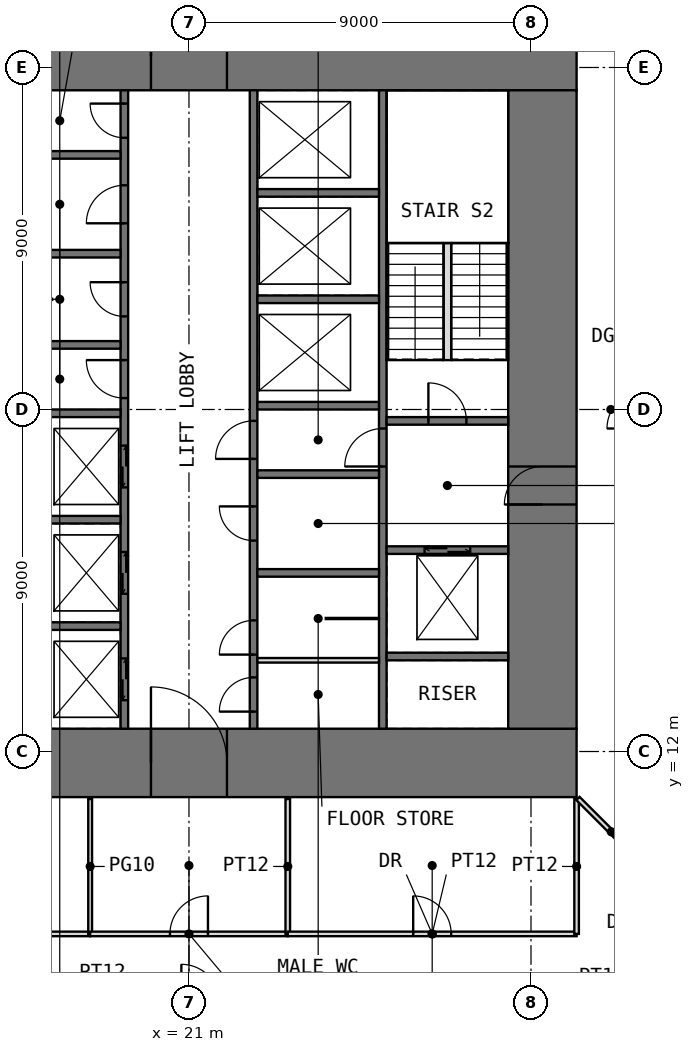
"""IFC4 building model, lengths in metres.
Left out: names, types, materials, properties, quantities, classifications, styles, units other than length and angle.
Written with IfcOpenShell. Run it as: python <this file> out.ifc"""

import sys

from ifc_helpers import new_model, si_unit, direction, frame, frame_2d, origin, place, context, subcontext, project, spatial, rectangle, extrude, element, fill, save


model = new_model("IFC4")
c1 = context("Model", 3, precision=1e-05, world=origin(), true_north=direction((0.0, 1.0)))
c2 = subcontext(c1, "Body", "Model", "MODEL_VIEW")
j1 = project(units=[si_unit("LENGTHUNIT", "METRE"), si_unit("PLANEANGLEUNIT", "RADIAN")], contexts=[c1])
p1 = place(None, origin())
s1 = spatial("IfcSite", under=j1, at=p1, CompositionType="ELEMENT")
p2 = place(p1, origin())
s2 = spatial("IfcBuilding", under=s1, at=p2, CompositionType="ELEMENT")
p3 = place(p2, frame((0.0, 0.0, 38.5)))
s3 = spatial("IfcBuildingStorey", under=s2, at=p3, CompositionType="ELEMENT", Elevation=38.5)
p4 = place(p3, frame((10.8, 11.7, -0.05), z_axis=(0.0, 0.0, 1.0), x_axis=(1.0, 0.0, 0.0)))
e1 = element("IfcWall", 1, at=p4, inside=s3, PredefinedType="SHEAR", context=c2, shape_type="SweptSolid", body=[
    extrude(rectangle(XDim=20.4, YDim=1.8, at=frame_2d((10.2, 0.0))), origin(), (0.0, 0.0, 1.0), 4.0),
])
p5 = place(p4, frame((9.2, 0.0, 0.05)))
e2 = element("IfcOpeningElement", 2, at=p5, cuts=e1, PredefinedType="OPENING", context=c2, shape_type="SweptSolid", body=[
    extrude(rectangle(XDim=2.0, YDim=2.2, at=frame_2d((1.0, 1.1))), frame((0.0, 0.91, 0.0), z_axis=(0.0, -1.0, 0.0), x_axis=(1.0, 0.0, 0.0)), (0.0, 0.0, 1.0), 1.82),
])
p6 = place(p3, frame((10.8, 30.3, -0.05), z_axis=(0.0, 0.0, 1.0), x_axis=(1.0, 0.0, 0.0)))
e3 = element("IfcWall", 3, at=p6, inside=s3, PredefinedType="SHEAR", context=c2, shape_type="SweptSolid", body=[
    extrude(rectangle(XDim=20.4, YDim=1.8, at=frame_2d((10.2, 0.0))), origin(), (0.0, 0.0, 1.0), 4.0),
])
p7 = place(p6, frame((9.2, 0.0, 0.05)))
e4 = element("IfcOpeningElement", 4, at=p7, cuts=e3, PredefinedType="OPENING", context=c2, shape_type="SweptSolid", body=[
    extrude(rectangle(XDim=2.0, YDim=2.2, at=frame_2d((1.0, 1.1))), frame((0.0, 0.91, 0.0), z_axis=(0.0, -1.0, 0.0), x_axis=(1.0, 0.0, 0.0)), (0.0, 0.0, 1.0), 1.82),
])
p8 = place(p3, frame((30.3, 12.6, -0.05), z_axis=(0.0, 0.0, 1.0), x_axis=(0.0, 1.0, 0.0)))
e5 = element("IfcWall", 5, at=p8, inside=s3, PredefinedType="SHEAR", context=c2, shape_type="SweptSolid", body=[
    extrude(rectangle(XDim=16.8, YDim=1.8, at=frame_2d((8.4, 0.0))), origin(), (0.0, 0.0, 1.0), 4.0),
])
p9 = place(p8, frame((5.9, 0.0, 0.05)))
e6 = element("IfcOpeningElement", 6, at=p9, cuts=e5, PredefinedType="OPENING", context=c2, shape_type="SweptSolid", body=[
    extrude(rectangle(XDim=1.0, YDim=2.2, at=frame_2d((0.5, 1.1))), frame((0.0, 0.91, 0.0), z_axis=(0.0, -1.0, 0.0), x_axis=(1.0, 0.0, 0.0)), (0.0, 0.0, 1.0), 1.82),
])
p10 = place(p3, frame((19.3, 12.6, -0.05), z_axis=(0.0, 0.0, 1.0), x_axis=(0.0, 1.0, 0.0)))
e7 = element("IfcWall", 7, at=p10, inside=s3, PredefinedType="SHEAR", context=c2, shape_type="SweptSolid", body=[
    extrude(rectangle(XDim=16.8, YDim=0.2, at=frame_2d((8.4, 0.0))), origin(), (0.0, 0.0, 1.0), 4.0),
])
p11 = place(p10, frame((8.7, 0.0, 0.05)))
e8 = element("IfcOpeningElement", 8, at=p11, cuts=e7, PredefinedType="OPENING", context=c2, shape_type="SweptSolid", body=[
    extrude(rectangle(XDim=1.0, YDim=2.2, at=frame_2d((0.5, 1.1))), frame((0.0, 0.11, 0.0), z_axis=(0.0, -1.0, 0.0), x_axis=(1.0, 0.0, 0.0)), (0.0, 0.0, 1.0), 0.22),
])
p12 = place(p10, frame((10.85, 0.0, 0.05)))
e9 = element("IfcOpeningElement", 9, at=p12, cuts=e7, PredefinedType="OPENING", context=c2, shape_type="SweptSolid", body=[
    extrude(rectangle(XDim=0.9, YDim=2.2, at=frame_2d((0.45, 1.1))), frame((0.0, 0.11, 0.0), z_axis=(0.0, -1.0, 0.0), x_axis=(1.0, 0.0, 0.0)), (0.0, 0.0, 1.0), 0.22),
])
p13 = place(p10, frame((13.3, 0.0, 0.05)))
e10 = element("IfcOpeningElement", 10, at=p13, cuts=e7, PredefinedType="OPENING", context=c2, shape_type="SweptSolid", body=[
    extrude(rectangle(XDim=1.0, YDim=2.2, at=frame_2d((0.5, 1.1))), frame((0.0, 0.11, 0.0), z_axis=(0.0, -1.0, 0.0), x_axis=(1.0, 0.0, 0.0)), (0.0, 0.0, 1.0), 0.22),
])
p14 = place(p10, frame((15.55, 0.0, 0.05)))
e11 = element("IfcOpeningElement", 11, at=p14, cuts=e7, PredefinedType="OPENING", context=c2, shape_type="SweptSolid", body=[
    extrude(rectangle(XDim=0.9, YDim=2.2, at=frame_2d((0.45, 1.1))), frame((0.0, 0.11, 0.0), z_axis=(0.0, -1.0, 0.0), x_axis=(1.0, 0.0, 0.0)), (0.0, 0.0, 1.0), 0.22),
])
p15 = place(p10, frame((0.75, 0.0, 0.05)))
e12 = element("IfcOpeningElement", 12, at=p15, cuts=e7, PredefinedType="OPENING", context=c2, shape_type="SweptSolid", body=[
    extrude(rectangle(XDim=1.1, YDim=2.2, at=frame_2d((0.55, 1.1))), frame((0.0, 0.11, 0.0), z_axis=(0.0, -1.0, 0.0), x_axis=(1.0, 0.0, 0.0)), (0.0, 0.0, 1.0), 0.22),
])
p16 = place(p10, frame((3.55, 0.0, 0.05)))
e13 = element("IfcOpeningElement", 13, at=p16, cuts=e7, PredefinedType="OPENING", context=c2, shape_type="SweptSolid", body=[
    extrude(rectangle(XDim=1.1, YDim=2.2, at=frame_2d((0.55, 1.1))), frame((0.0, 0.11, 0.0), z_axis=(0.0, -1.0, 0.0), x_axis=(1.0, 0.0, 0.0)), (0.0, 0.0, 1.0), 0.22),
])
p17 = place(p10, frame((6.35, 0.0, 0.05)))
e14 = element("IfcOpeningElement", 14, at=p17, cuts=e7, PredefinedType="OPENING", context=c2, shape_type="SweptSolid", body=[
    extrude(rectangle(XDim=1.1, YDim=2.2, at=frame_2d((0.55, 1.1))), frame((0.0, 0.11, 0.0), z_axis=(0.0, -1.0, 0.0), x_axis=(1.0, 0.0, 0.0)), (0.0, 0.0, 1.0), 0.22),
])
p18 = place(p3, frame((22.7, 12.6, -0.05), z_axis=(0.0, 0.0, 1.0), x_axis=(0.0, 1.0, 0.0)))
e15 = element("IfcWall", 15, at=p18, inside=s3, PredefinedType="SHEAR", context=c2, shape_type="SweptSolid", body=[
    extrude(rectangle(XDim=16.8, YDim=0.2, at=frame_2d((8.4, 0.0))), origin(), (0.0, 0.0, 1.0), 4.0),
])
p19 = place(p18, frame((0.45, 0.0, 0.05)))
e16 = element("IfcOpeningElement", 16, at=p19, cuts=e15, PredefinedType="OPENING", context=c2, shape_type="SweptSolid", body=[
    extrude(rectangle(XDim=0.9, YDim=2.2, at=frame_2d((0.45, 1.1))), frame((0.0, 0.11, 0.0), z_axis=(0.0, -1.0, 0.0), x_axis=(1.0, 0.0, 0.0)), (0.0, 0.0, 1.0), 0.22),
])
p20 = place(p18, frame((7.1, 0.0, 0.05)))
e17 = element("IfcOpeningElement", 17, at=p20, cuts=e15, PredefinedType="OPENING", context=c2, shape_type="SweptSolid", body=[
    extrude(rectangle(XDim=1.0, YDim=2.2, at=frame_2d((0.5, 1.1))), frame((0.0, 0.11, 0.0), z_axis=(0.0, -1.0, 0.0), x_axis=(1.0, 0.0, 0.0)), (0.0, 0.0, 1.0), 0.22),
])
p21 = place(p18, frame((1.95, 0.0, 0.05)))
e18 = element("IfcOpeningElement", 18, at=p21, cuts=e15, PredefinedType="OPENING", context=c2, shape_type="SweptSolid", body=[
    extrude(rectangle(XDim=0.9, YDim=2.2, at=frame_2d((0.45, 1.1))), frame((0.0, 0.11, 0.0), z_axis=(0.0, -1.0, 0.0), x_axis=(1.0, 0.0, 0.0)), (0.0, 0.0, 1.0), 0.22),
])
p22 = place(p18, frame((4.95, 0.0, 0.05)))
e19 = element("IfcOpeningElement", 19, at=p22, cuts=e15, PredefinedType="OPENING", context=c2, shape_type="SweptSolid", body=[
    extrude(rectangle(XDim=0.9, YDim=2.2, at=frame_2d((0.45, 1.1))), frame((0.0, 0.11, 0.0), z_axis=(0.0, -1.0, 0.0), x_axis=(1.0, 0.0, 0.0)), (0.0, 0.0, 1.0), 0.22),
])
p23 = place(p3, frame((26.1, 12.6, -0.05), z_axis=(0.0, 0.0, 1.0), x_axis=(0.0, 1.0, 0.0)))
e20 = element("IfcWall", 20, at=p23, inside=s3, PredefinedType="SHEAR", context=c2, shape_type="SweptSolid", body=[
    extrude(rectangle(XDim=16.8, YDim=0.2, at=frame_2d((8.4, 0.0))), origin(), (0.0, 0.0, 1.0), 4.0),
])
p24 = place(p23, frame((6.9, 0.0, 0.05)))
e21 = element("IfcOpeningElement", 21, at=p24, cuts=e20, PredefinedType="OPENING", context=c2, shape_type="SweptSolid", body=[
    extrude(rectangle(XDim=1.0, YDim=2.2, at=frame_2d((0.5, 1.1))), frame((0.0, 0.11, 0.0), z_axis=(0.0, -1.0, 0.0), x_axis=(1.0, 0.0, 0.0)), (0.0, 0.0, 1.0), 0.22),
])
for number, where, z_axis, x_axis in (
    (22, (16.0, 15.3, -0.05), (0.0, 0.0, 1.0), (1.0, 0.0, 0.0)),
    (23, (16.0, 18.1, -0.05), (0.0, 0.0, 1.0), (1.0, 0.0, 0.0)),
    (24, (16.0, 20.9, -0.05), (0.0, 0.0, 1.0), (1.0, 0.0, 0.0)),
    (25, (16.0, 22.7, -0.05), (0.0, 0.0, 1.0), (1.0, 0.0, 0.0)),
    (26, (16.0, 25.1, -0.05), (0.0, 0.0, 1.0), (1.0, 0.0, 0.0)),
    (27, (16.0, 27.7, -0.05), (0.0, 0.0, 1.0), (1.0, 0.0, 0.0)),
    (28, (22.8, 16.7, -0.05), (0.0, 0.0, 1.0), (1.0, 0.0, 0.0)),
    (29, (22.8, 19.3, -0.05), (0.0, 0.0, 1.0), (1.0, 0.0, 0.0)),
    (30, (22.8, 21.1, -0.05), (0.0, 0.0, 1.0), (1.0, 0.0, 0.0)),
    (31, (22.8, 23.9, -0.05), (0.0, 0.0, 1.0), (1.0, 0.0, 0.0)),
    (32, (22.8, 26.7, -0.05), (0.0, 0.0, 1.0), (1.0, 0.0, 0.0)),
    (33, (26.2, 14.5, -0.05), (0.0, 0.0, 1.0), (1.0, 0.0, 0.0)),
):
    element("IfcWall", number, at=place(p3, frame(where, z_axis=z_axis, x_axis=x_axis)), inside=s3, PredefinedType="SHEAR", context=c2, shape_type="SweptSolid", body=[
        extrude(rectangle(XDim=3.2, YDim=0.2, at=frame_2d((1.6, 0.0))), origin(), (0.0, 0.0, 1.0), 4.0),
    ])
p25 = place(p3, frame((26.2, 17.3, -0.05), z_axis=(0.0, 0.0, 1.0), x_axis=(1.0, 0.0, 0.0)))
e34 = element("IfcWall", 34, at=p25, inside=s3, PredefinedType="SHEAR", context=c2, shape_type="SweptSolid", body=[
    extrude(rectangle(XDim=3.2, YDim=0.2, at=frame_2d((1.6, 0.0))), origin(), (0.0, 0.0, 1.0), 4.0),
])
p26 = place(p25, frame((1.0, 0.0, 0.05)))
e35 = element("IfcOpeningElement", 35, at=p26, cuts=e34, PredefinedType="OPENING", context=c2, shape_type="SweptSolid", body=[
    extrude(rectangle(XDim=1.2, YDim=2.2, at=frame_2d((0.6, 1.1))), frame((0.0, 0.11, 0.0), z_axis=(0.0, -1.0, 0.0), x_axis=(1.0, 0.0, 0.0)), (0.0, 0.0, 1.0), 0.22),
])
p27 = place(p3, frame((26.2, 20.7, -0.05), z_axis=(0.0, 0.0, 1.0), x_axis=(1.0, 0.0, 0.0)))
e36 = element("IfcWall", 36, at=p27, inside=s3, PredefinedType="SHEAR", context=c2, shape_type="SweptSolid", body=[
    extrude(rectangle(XDim=3.2, YDim=0.2, at=frame_2d((1.6, 0.0))), origin(), (0.0, 0.0, 1.0), 4.0),
])
p28 = place(p27, frame((1.1, 0.0, 0.05)))
e37 = element("IfcOpeningElement", 37, at=p28, cuts=e36, PredefinedType="OPENING", context=c2, shape_type="SweptSolid", body=[
    extrude(rectangle(XDim=1.0, YDim=2.2, at=frame_2d((0.5, 1.1))), frame((0.0, 0.11, 0.0), z_axis=(0.0, -1.0, 0.0), x_axis=(1.0, 0.0, 0.0)), (0.0, 0.0, 1.0), 0.22),
])
p29 = place(p3, frame((22.8, 14.4, 0.0), z_axis=(0.0, 0.0, 1.0), x_axis=(1.0, 0.0, 0.0)))
e38 = element("IfcWall", 38, at=p29, inside=s3, PredefinedType="PARTITIONING", context=c2, shape_type="SweptSolid", body=[
    extrude(rectangle(XDim=3.2, YDim=0.12, at=frame_2d((1.6, 0.0))), origin(), (0.0, 0.0, 1.0), 3.75),
])
p30 = place(p3, frame((24.6, 15.5, 0.0), z_axis=(0.0, 0.0, 1.0), x_axis=(1.0, 0.0, 0.0)))
e39 = element("IfcWall", 39, at=p30, inside=s3, PredefinedType="PARTITIONING", context=c2, shape_type="SweptSolid", body=[
    extrude(rectangle(XDim=1.4, YDim=0.03, at=frame_2d((0.7, 0.0))), origin(), (0.0, 0.0, 1.0), 3.75),
])
p31 = place(p3, frame((14.4, 7.2, 0.0), z_axis=(0.0, 0.0, 1.0), x_axis=(1.0, 0.0, 0.0)))
e40 = element("IfcWall", 40, at=p31, inside=s3, PredefinedType="PARTITIONING", context=c2, shape_type="SweptSolid", body=[
    extrude(rectangle(XDim=4.0, YDim=0.12, at=frame_2d((2.0, 0.0))), origin(), (0.0, 0.0, 1.0), 3.75),
])
p32 = place(p31, frame((1.5, 0.0, 0.0)))
e41 = element("IfcOpeningElement", 41, at=p32, cuts=e40, PredefinedType="OPENING", context=c2, shape_type="SweptSolid", body=[
    extrude(rectangle(XDim=1.0, YDim=2.4, at=frame_2d((0.5, 1.2))), frame((0.0, 0.07, 0.0), z_axis=(0.0, -1.0, 0.0), x_axis=(1.0, 0.0, 0.0)), (0.0, 0.0, 1.0), 0.14),
])
p33 = place(p3, frame((18.4, 7.2, 0.0), z_axis=(0.0, 0.0, 1.0), x_axis=(0.0, 1.0, 0.0)))
e42 = element("IfcWall", 42, at=p33, inside=s3, PredefinedType="PARTITIONING", context=c2, shape_type="SweptSolid", body=[
    extrude(rectangle(XDim=3.55, YDim=0.1, at=frame_2d((1.775, 0.0))), origin(), (0.0, 0.0, 1.0), 3.75),
])
p34 = place(p3, frame((18.4, 7.2, 0.0), z_axis=(0.0, 0.0, 1.0), x_axis=(1.0, 0.0, 0.0)))
e43 = element("IfcWall", 43, at=p34, inside=s3, PredefinedType="PARTITIONING", context=c2, shape_type="SweptSolid", body=[
    extrude(rectangle(XDim=5.2, YDim=0.12, at=frame_2d((2.6, 0.0))), origin(), (0.0, 0.0, 1.0), 3.75),
])
p35 = place(p34, frame((2.1, 0.0, 0.0)))
e44 = element("IfcOpeningElement", 44, at=p35, cuts=e43, PredefinedType="OPENING", context=c2, shape_type="SweptSolid", body=[
    extrude(rectangle(XDim=1.0, YDim=2.4, at=frame_2d((0.5, 1.2))), frame((0.0, 0.07, 0.0), z_axis=(0.0, -1.0, 0.0), x_axis=(1.0, 0.0, 0.0)), (0.0, 0.0, 1.0), 0.14),
])
p36 = place(p3, frame((23.6, 7.2, 0.0), z_axis=(0.0, 0.0, 1.0), x_axis=(0.0, 1.0, 0.0)))
e45 = element("IfcWall", 45, at=p36, inside=s3, PredefinedType="PARTITIONING", context=c2, shape_type="SweptSolid", body=[
    extrude(rectangle(XDim=3.55, YDim=0.12, at=frame_2d((1.775, 0.0))), origin(), (0.0, 0.0, 1.0), 3.75),
])
p37 = place(p3, frame((23.6, 7.2, 0.0), z_axis=(0.0, 0.0, 1.0), x_axis=(1.0, 0.0, 0.0)))
e46 = element("IfcWall", 46, at=p37, inside=s3, PredefinedType="PARTITIONING", context=c2, shape_type="SweptSolid", body=[
    extrude(rectangle(XDim=7.6, YDim=0.12, at=frame_2d((3.8, 0.0))), origin(), (0.0, 0.0, 1.0), 3.75),
])
p38 = place(p37, frame((3.3, 0.0, 0.0)))
e47 = element("IfcOpeningElement", 47, at=p38, cuts=e46, PredefinedType="OPENING", context=c2, shape_type="SweptSolid", body=[
    extrude(rectangle(XDim=1.0, YDim=2.2, at=frame_2d((0.5, 1.1))), frame((0.0, 0.07, 0.0), z_axis=(0.0, -1.0, 0.0), x_axis=(1.0, 0.0, 0.0)), (0.0, 0.0, 1.0), 0.14),
])
p39 = place(p3, frame((31.2, 7.2, 0.0), z_axis=(0.0, 0.0, 1.0), x_axis=(0.0, 1.0, 0.0)))
e48 = element("IfcWall", 48, at=p39, inside=s3, PredefinedType="PARTITIONING", context=c2, shape_type="SweptSolid", body=[
    extrude(rectangle(XDim=3.55, YDim=0.12, at=frame_2d((1.775, 0.0))), origin(), (0.0, 0.0, 1.0), 3.75),
])
p40 = place(p3, frame((31.235, 10.765, 0.0), z_axis=(0.0, 0.0, 1.0), x_axis=(0.707106781187, -0.707106781187, 0.0)))
e49 = element("IfcWall", 49, at=p40, inside=s3, PredefinedType="PARTITIONING", context=c2, shape_type="SweptSolid", body=[
    extrude(rectangle(XDim=2.481, YDim=0.12, at=frame_2d((1.241, 0.0))), origin(), (0.0, 0.0, 1.0), 3.75),
])
p41 = place(p3, frame((27.8, 22.3, 0.0), z_axis=(0.0, 0.0, 1.0), x_axis=(0.0, 1.0, 0.0)))
e50 = element("IfcWall", 50, at=p41, inside=s3, PredefinedType="PARTITIONING", context=c2, shape_type="SweptSolid", body=[
    extrude(rectangle(XDim=3.08, YDim=0.2, at=frame_2d((1.54, 0.0))), origin(), (0.0, 0.0, 1.0), 4.0),
])
p42 = place(p5, origin())
e51 = element("IfcDoor", 51, at=p42, inside=s3, OperationType="DOUBLE_DOOR_SINGLE_SWING", PredefinedType="DOOR", context=c2, shape_type="SweptSolid", body=[
    extrude(rectangle(XDim=2.0, YDim=2.2, at=frame_2d((1.0, 1.1))), frame((0.0, 0.025, 0.0), z_axis=(0.0, -1.0, 0.0), x_axis=(1.0, 0.0, 0.0)), (0.0, 0.0, 1.0), 0.05),
])
fill(e2, e51)
p43 = place(p7, origin())
e52 = element("IfcDoor", 52, at=p43, inside=s3, OperationType="DOUBLE_DOOR_SINGLE_SWING", PredefinedType="DOOR", context=c2, shape_type="SweptSolid", body=[
    extrude(rectangle(XDim=2.0, YDim=2.2, at=frame_2d((1.0, 1.1))), frame((0.0, 0.025, 0.0), z_axis=(0.0, -1.0, 0.0), x_axis=(1.0, 0.0, 0.0)), (0.0, 0.0, 1.0), 0.05),
])
fill(e4, e52)
p44 = place(p19, origin())
e53 = element("IfcDoor", 53, at=p44, inside=s3, OperationType="SINGLE_SWING_LEFT", PredefinedType="DOOR", context=c2, shape_type="SweptSolid", body=[
    extrude(rectangle(XDim=0.9, YDim=2.2, at=frame_2d((0.45, 1.1))), frame((0.0, 0.025, 0.0), z_axis=(0.0, -1.0, 0.0), x_axis=(1.0, 0.0, 0.0)), (0.0, 0.0, 1.0), 0.05),
])
fill(e16, e53)
p45 = place(p9, origin())
e54 = element("IfcDoor", 54, at=p45, inside=s3, OperationType="SINGLE_SWING_LEFT", PredefinedType="DOOR", context=c2, shape_type="SweptSolid", body=[
    extrude(rectangle(XDim=1.0, YDim=2.2, at=frame_2d((0.5, 1.1))), frame((0.0, 0.025, 0.0), z_axis=(0.0, -1.0, 0.0), x_axis=(1.0, 0.0, 0.0)), (0.0, 0.0, 1.0), 0.05),
])
fill(e6, e54)
p46 = place(p28, origin())
e55 = element("IfcDoor", 55, at=p46, inside=s3, OperationType="SINGLE_SWING_LEFT", PredefinedType="DOOR", context=c2, shape_type="SweptSolid", body=[
    extrude(rectangle(XDim=1.0, YDim=2.2, at=frame_2d((0.5, 1.1))), frame((0.0, 0.025, 0.0), z_axis=(0.0, -1.0, 0.0), x_axis=(1.0, 0.0, 0.0)), (0.0, 0.0, 1.0), 0.05),
])
fill(e37, e55)
p47 = place(p24, origin())
e56 = element("IfcDoor", 56, at=p47, inside=s3, OperationType="SINGLE_SWING_LEFT", PredefinedType="DOOR", context=c2, shape_type="SweptSolid", body=[
    extrude(rectangle(XDim=1.0, YDim=2.2, at=frame_2d((0.5, 1.1))), frame((0.0, 0.025, 0.0), z_axis=(0.0, -1.0, 0.0), x_axis=(1.0, 0.0, 0.0)), (0.0, 0.0, 1.0), 0.05),
])
fill(e21, e56)
p48 = place(p11, origin())
e57 = element("IfcDoor", 57, at=p48, inside=s3, OperationType="SINGLE_SWING_RIGHT", PredefinedType="DOOR", context=c2, shape_type="SweptSolid", body=[
    extrude(rectangle(XDim=1.0, YDim=2.2, at=frame_2d((0.5, 1.1))), frame((0.0, 0.025, 0.0), z_axis=(0.0, -1.0, 0.0), x_axis=(1.0, 0.0, 0.0)), (0.0, 0.0, 1.0), 0.05),
])
fill(e8, e57)
p49 = place(p20, origin())
e58 = element("IfcDoor", 58, at=p49, inside=s3, OperationType="SINGLE_SWING_LEFT", PredefinedType="DOOR", context=c2, shape_type="SweptSolid", body=[
    extrude(rectangle(XDim=1.0, YDim=2.2, at=frame_2d((0.5, 1.1))), frame((0.0, 0.025, 0.0), z_axis=(0.0, -1.0, 0.0), x_axis=(1.0, 0.0, 0.0)), (0.0, 0.0, 1.0), 0.05),
])
fill(e17, e58)
p50 = place(p12, origin())
e59 = element("IfcDoor", 59, at=p50, inside=s3, OperationType="SINGLE_SWING_RIGHT", PredefinedType="DOOR", context=c2, shape_type="SweptSolid", body=[
    extrude(rectangle(XDim=0.9, YDim=2.2, at=frame_2d((0.45, 1.1))), frame((0.0, 0.025, 0.0), z_axis=(0.0, -1.0, 0.0), x_axis=(1.0, 0.0, 0.0)), (0.0, 0.0, 1.0), 0.05),
])
fill(e9, e59)
p51 = place(p13, origin())
e60 = element("IfcDoor", 60, at=p51, inside=s3, OperationType="SINGLE_SWING_LEFT", PredefinedType="DOOR", context=c2, shape_type="SweptSolid", body=[
    extrude(rectangle(XDim=1.0, YDim=2.2, at=frame_2d((0.5, 1.1))), frame((0.0, 0.025, 0.0), z_axis=(0.0, -1.0, 0.0), x_axis=(1.0, 0.0, 0.0)), (0.0, 0.0, 1.0), 0.05),
])
fill(e10, e60)
p52 = place(p14, origin())
e61 = element("IfcDoor", 61, at=p52, inside=s3, OperationType="SINGLE_SWING_RIGHT", PredefinedType="DOOR", context=c2, shape_type="SweptSolid", body=[
    extrude(rectangle(XDim=0.9, YDim=2.2, at=frame_2d((0.45, 1.1))), frame((0.0, 0.025, 0.0), z_axis=(0.0, -1.0, 0.0), x_axis=(1.0, 0.0, 0.0)), (0.0, 0.0, 1.0), 0.05),
])
fill(e11, e61)
p53 = place(p21, origin())
e62 = element("IfcDoor", 62, at=p53, inside=s3, OperationType="SINGLE_SWING_LEFT", PredefinedType="DOOR", context=c2, shape_type="SweptSolid", body=[
    extrude(rectangle(XDim=0.9, YDim=2.2, at=frame_2d((0.45, 1.1))), frame((0.0, 0.025, 0.0), z_axis=(0.0, -1.0, 0.0), x_axis=(1.0, 0.0, 0.0)), (0.0, 0.0, 1.0), 0.05),
])
fill(e18, e62)
p54 = place(p22, origin())
e63 = element("IfcDoor", 63, at=p54, inside=s3, OperationType="SINGLE_SWING_RIGHT", PredefinedType="DOOR", context=c2, shape_type="SweptSolid", body=[
    extrude(rectangle(XDim=0.9, YDim=2.2, at=frame_2d((0.45, 1.1))), frame((0.0, 0.025, 0.0), z_axis=(0.0, -1.0, 0.0), x_axis=(1.0, 0.0, 0.0)), (0.0, 0.0, 1.0), 0.05),
])
fill(e19, e63)
p55 = place(p38, origin())
e64 = element("IfcDoor", 64, at=p55, inside=s3, OperationType="SINGLE_SWING_LEFT", PredefinedType="DOOR", context=c2, shape_type="SweptSolid", body=[
    extrude(rectangle(XDim=1.0, YDim=2.2, at=frame_2d((0.5, 1.1))), frame((0.0, 0.025, 0.0), z_axis=(0.0, -1.0, 0.0), x_axis=(1.0, 0.0, 0.0)), (0.0, 0.0, 1.0), 0.05),
])
fill(e47, e64)
p56 = place(p35, origin())
e65 = element("IfcDoor", 65, at=p56, inside=s3, OperationType="SINGLE_SWING_RIGHT", PredefinedType="DOOR", context=c2, shape_type="SweptSolid", body=[
    extrude(rectangle(XDim=1.0, YDim=2.4, at=frame_2d((0.5, 1.2))), frame((0.0, 0.025, 0.0), z_axis=(0.0, -1.0, 0.0), x_axis=(1.0, 0.0, 0.0)), (0.0, 0.0, 1.0), 0.05),
])
fill(e44, e65)
p57 = place(p15, origin())
e66 = element("IfcDoor", 66, at=p57, inside=s3, OperationType="DOUBLE_DOOR_SLIDING", PredefinedType="DOOR", context=c2, shape_type="SweptSolid", body=[
    extrude(rectangle(XDim=1.1, YDim=2.2, at=frame_2d((0.55, 1.1))), frame((0.0, 0.025, 0.0), z_axis=(0.0, -1.0, 0.0), x_axis=(1.0, 0.0, 0.0)), (0.0, 0.0, 1.0), 0.05),
])
fill(e12, e66)
p58 = place(p16, origin())
e67 = element("IfcDoor", 67, at=p58, inside=s3, OperationType="DOUBLE_DOOR_SLIDING", PredefinedType="DOOR", context=c2, shape_type="SweptSolid", body=[
    extrude(rectangle(XDim=1.1, YDim=2.2, at=frame_2d((0.55, 1.1))), frame((0.0, 0.025, 0.0), z_axis=(0.0, -1.0, 0.0), x_axis=(1.0, 0.0, 0.0)), (0.0, 0.0, 1.0), 0.05),
])
fill(e13, e67)
p59 = place(p17, origin())
e68 = element("IfcDoor", 68, at=p59, inside=s3, OperationType="DOUBLE_DOOR_SLIDING", PredefinedType="DOOR", context=c2, shape_type="SweptSolid", body=[
    extrude(rectangle(XDim=1.1, YDim=2.2, at=frame_2d((0.55, 1.1))), frame((0.0, 0.025, 0.0), z_axis=(0.0, -1.0, 0.0), x_axis=(1.0, 0.0, 0.0)), (0.0, 0.0, 1.0), 0.05),
])
fill(e14, e68)
p60 = place(p26, origin())
e69 = element("IfcDoor", 69, at=p60, inside=s3, OperationType="DOUBLE_DOOR_SLIDING", PredefinedType="DOOR", context=c2, shape_type="SweptSolid", body=[
    extrude(rectangle(XDim=1.2, YDim=2.2, at=frame_2d((0.6, 1.1))), frame((0.0, 0.025, 0.0), z_axis=(0.0, -1.0, 0.0), x_axis=(1.0, 0.0, 0.0)), (0.0, 0.0, 1.0), 0.05),
])
fill(e35, e69)
save(model, sys.argv[1])
